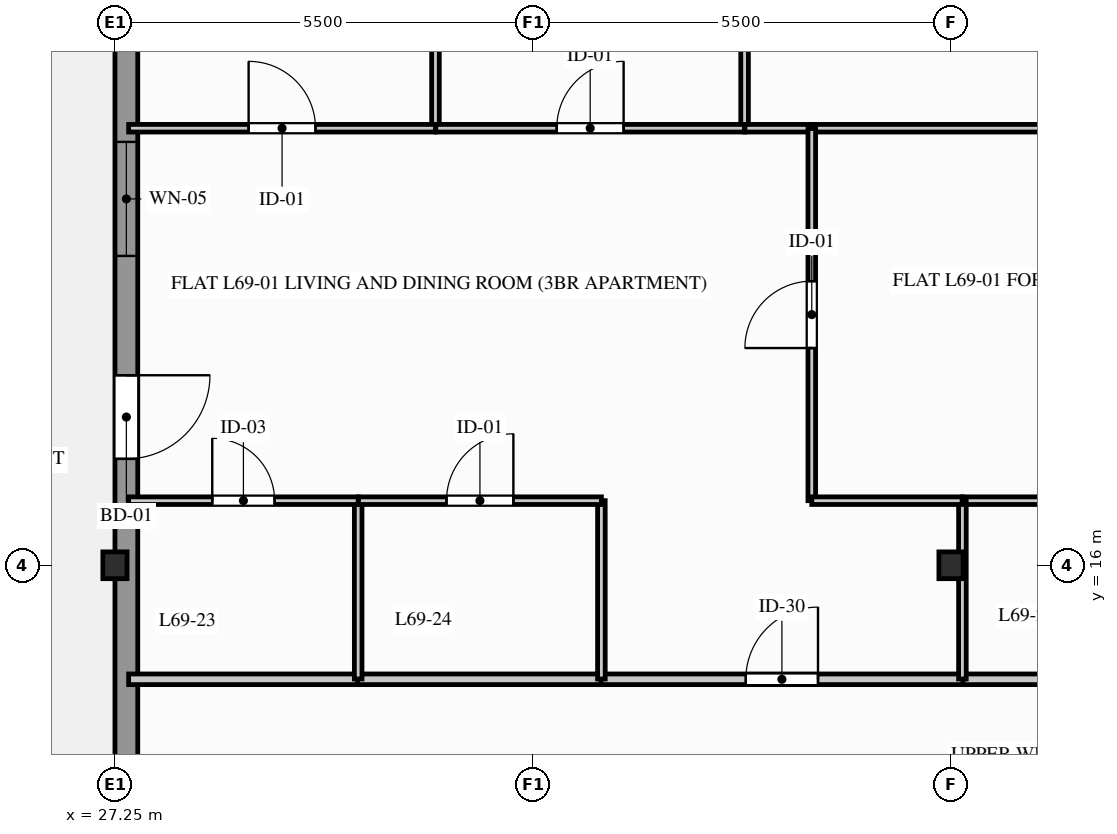
"""IFC4 building model, lengths in metres.
Left out: names, types, materials, properties, quantities, classifications, styles, units other than length and angle.
Written with IfcOpenShell. Run it as: python <this file> out.ifc"""

import sys

from ifc_helpers import new_model, si_unit, direction, frame, frame_2d, origin, origin_2d, place, context, subcontext, project, spatial, rectangle, i_section, extrude, element, fill, save


model = new_model("IFC4")
c1 = context("Model", 3, precision=1e-05, world=origin(), true_north=direction((0.0, 1.0)))
c2 = subcontext(c1, "Body", "Model", "MODEL_VIEW")
j1 = project(units=[si_unit("LENGTHUNIT", "METRE"), si_unit("PLANEANGLEUNIT", "RADIAN")], contexts=[c1])
p1 = place(None, origin())
s1 = spatial("IfcSite", under=j1, at=p1, CompositionType="ELEMENT")
p2 = place(p1, origin())
s2 = spatial("IfcBuilding", under=s1, at=p2, CompositionType="ELEMENT")
p3 = place(p2, frame((0.0, 0.0, 227.3)))
s3 = spatial("IfcBuildingStorey", under=s2, at=p3, CompositionType="ELEMENT", Elevation=227.3)
for number, where, z_axis, x_axis in (
    (1, (27.25, 16.0, 0.0), (0.0, 0.0, 1.0), (1.0, 0.0, 0.0)),
    (2, (38.25, 16.0, 0.0), (0.0, 0.0, 1.0), (1.0, 0.0, 0.0)),
):
    element("IfcColumn", number, at=place(p3, frame(where, z_axis=z_axis, x_axis=x_axis)), inside=s3, PredefinedType="COLUMN", context=c2, shape_type="SweptSolid", body=[
        extrude(i_section(OverallWidth=0.318, OverallDepth=0.353, WebThickness=0.023, FlangeThickness=0.038, FilletRadius=0.015, at=origin_2d()), origin(), (0.0, 0.0, 1.0), 3.1),
    ])
p4 = place(p3, frame((27.4, 24.0, 0.0), z_axis=(0.0, 0.0, 1.0), x_axis=(0.0, -1.0, 0.0)))
e3 = element("IfcWall", 3, at=p4, inside=s3, PredefinedType="STANDARD", context=c2, shape_type="SweptSolid", body=[
    extrude(rectangle(XDim=21.5, YDim=0.3, at=frame_2d((10.75, 0.0))), origin(), (0.0, 0.0, 1.0), 2.332),
])
p5 = place(p4, frame((5.5, 0.0, 0.0)))
e4 = element("IfcOpeningElement", 4, at=p5, cuts=e3, PredefinedType="OPENING", context=c2, shape_type="SweptSolid", body=[
    extrude(rectangle(XDim=1.1, YDim=2.2, at=frame_2d((0.55, 1.1))), frame((0.0, 0.16, 0.0), z_axis=(0.0, -1.0, 0.0), x_axis=(1.0, 0.0, 0.0)), (0.0, 0.0, 1.0), 0.32),
])
p6 = place(p4, frame((2.43, 0.0, 0.312)))
e5 = element("IfcOpeningElement", 5, at=p6, cuts=e3, PredefinedType="OPENING", context=c2, shape_type="SweptSolid", body=[
    extrude(rectangle(XDim=1.5, YDim=1.8, at=frame_2d((0.75, 0.9))), frame((0.0, 0.16, 0.0), z_axis=(0.0, -1.0, 0.0), x_axis=(1.0, 0.0, 0.0)), (0.0, 0.0, 1.0), 0.32),
])
p7 = place(p3, frame((27.43, 14.5, 0.0), z_axis=(0.0, 0.0, 1.0), x_axis=(1.0, 0.0, 0.0)))
e6 = element("IfcWall", 6, at=p7, inside=s3, PredefinedType="PARTITIONING", context=c2, shape_type="SweptSolid", body=[
    extrude(rectangle(XDim=3.031, YDim=0.14, at=frame_2d((1.516, 0.0))), origin(), (0.0, 0.0, 1.0), 2.89),
])
p8 = place(p3, frame((30.443, 14.5, 0.0), z_axis=(0.0, 0.0, 1.0), x_axis=(1.0, 0.0, 0.0)))
e7 = element("IfcWall", 7, at=p8, inside=s3, PredefinedType="PARTITIONING", context=c2, shape_type="SweptSolid", body=[
    extrude(rectangle(XDim=3.219, YDim=0.14, at=frame_2d((1.609, 0.0))), origin(), (0.0, 0.0, 1.0), 2.89),
])
p9 = place(p3, frame((38.389, 14.5, 0.0), z_axis=(0.0, 0.0, 1.0), x_axis=(1.0, 0.0, 0.0)))
e8 = element("IfcWall", 8, at=p9, inside=s3, PredefinedType="PARTITIONING", context=c2, shape_type="SweptSolid", body=[
    extrude(rectangle(XDim=3.623, YDim=0.14, at=frame_2d((1.811, 0.0))), origin(), (0.0, 0.0, 1.0), 2.325),
])
p10 = place(p3, frame((33.643, 14.5, 0.0), z_axis=(0.0, 0.0, 1.0), x_axis=(1.0, 0.0, 0.0)))
e9 = element("IfcWall", 9, at=p10, inside=s3, PredefinedType="PARTITIONING", context=c2, shape_type="SweptSolid", body=[
    extrude(rectangle(XDim=4.765, YDim=0.14, at=frame_2d((2.382, 0.0))), origin(), (0.0, 0.0, 1.0), 2.325),
])
p11 = place(p10, frame((1.907, 0.0, 0.0)))
e10 = element("IfcOpeningElement", 10, at=p11, cuts=e9, PredefinedType="OPENING", context=c2, shape_type="SweptSolid", body=[
    extrude(rectangle(XDim=0.95, YDim=2.05, at=frame_2d((0.475, 1.025))), frame((0.0, 0.08, 0.0), z_axis=(0.0, -1.0, 0.0), x_axis=(1.0, 0.0, 0.0)), (0.0, 0.0, 1.0), 0.16),
])
p12 = place(p3, frame((30.45, 14.504, 0.0), z_axis=(0.0, 0.0, 1.0), x_axis=(0.0, 1.0, 0.0)))
e11 = element("IfcWall", 11, at=p12, inside=s3, PredefinedType="PARTITIONING", context=c2, shape_type="SweptSolid", body=[
    extrude(rectangle(XDim=2.346, YDim=0.1, at=frame_2d((1.173, 0.0))), origin(), (0.0, 0.0, 1.0), 2.325),
])
p13 = place(p3, frame((27.43, 16.85, 0.0), z_axis=(0.0, 0.0, 1.0), x_axis=(1.0, 0.0, 0.0)))
e12 = element("IfcWall", 12, at=p13, inside=s3, PredefinedType="PARTITIONING", context=c2, shape_type="SweptSolid", body=[
    extrude(rectangle(XDim=3.02, YDim=0.1, at=frame_2d((1.51, 0.0))), origin(), (0.0, 0.0, 1.0), 2.89),
])
p14 = place(p13, frame((1.1, 0.0, 0.0)))
e13 = element("IfcOpeningElement", 13, at=p14, cuts=e12, PredefinedType="OPENING", context=c2, shape_type="SweptSolid", body=[
    extrude(rectangle(XDim=0.82, YDim=2.02, at=frame_2d((0.41, 1.01))), frame((0.0, 0.06, 0.0), z_axis=(0.0, -1.0, 0.0), x_axis=(1.0, 0.0, 0.0)), (0.0, 0.0, 1.0), 0.12),
])
p15 = place(p3, frame((33.65, 14.504, 0.0), z_axis=(0.0, 0.0, 1.0), x_axis=(0.0, 1.0, 0.0)))
e14 = element("IfcWall", 14, at=p15, inside=s3, PredefinedType="PARTITIONING", context=c2, shape_type="SweptSolid", body=[
    extrude(rectangle(XDim=2.346, YDim=0.1, at=frame_2d((1.173, 0.0))), origin(), (0.0, 0.0, 1.0), 2.325),
])
p16 = place(p3, frame((30.454, 16.85, 0.0), z_axis=(0.0, 0.0, 1.0), x_axis=(1.0, 0.0, 0.0)))
e15 = element("IfcWall", 15, at=p16, inside=s3, PredefinedType="PARTITIONING", context=c2, shape_type="SweptSolid", body=[
    extrude(rectangle(XDim=3.196, YDim=0.1, at=frame_2d((1.598, 0.0))), origin(), (0.0, 0.0, 1.0), 2.89),
])
p17 = place(p16, frame((1.158, 0.0, 0.0)))
e16 = element("IfcOpeningElement", 16, at=p17, cuts=e15, PredefinedType="OPENING", context=c2, shape_type="SweptSolid", body=[
    extrude(rectangle(XDim=0.88, YDim=2.04, at=frame_2d((0.44, 1.02))), frame((0.0, 0.06, 0.0), z_axis=(0.0, -1.0, 0.0), x_axis=(1.0, 0.0, 0.0)), (0.0, 0.0, 1.0), 0.12),
])
p18 = place(p3, frame((38.4, 16.85, 0.0), z_axis=(0.0, 0.0, 1.0), x_axis=(1.0, 0.0, 0.0)))
e17 = element("IfcWall", 17, at=p18, inside=s3, PredefinedType="PARTITIONING", context=c2, shape_type="SweptSolid", body=[
    extrude(rectangle(XDim=3.6, YDim=0.1, at=frame_2d((1.8, 0.0))), origin(), (0.0, 0.0, 1.0), 2.325),
])
p19 = place(p18, frame((1.39, 0.0, 0.0)))
e18 = element("IfcOpeningElement", 18, at=p19, cuts=e17, PredefinedType="OPENING", context=c2, shape_type="SweptSolid", body=[
    extrude(rectangle(XDim=0.82, YDim=2.02, at=frame_2d((0.41, 1.01))), frame((0.0, 0.06, 0.0), z_axis=(0.0, -1.0, 0.0), x_axis=(1.0, 0.0, 0.0)), (0.0, 0.0, 1.0), 0.12),
])
p20 = place(p3, frame((38.4, 14.504, 0.0), z_axis=(0.0, 0.0, 1.0), x_axis=(0.0, 1.0, 0.0)))
e19 = element("IfcWall", 19, at=p20, inside=s3, PredefinedType="PARTITIONING", context=c2, shape_type="SweptSolid", body=[
    extrude(rectangle(XDim=2.346, YDim=0.1, at=frame_2d((1.173, 0.0))), origin(), (0.0, 0.0, 1.0), 2.325),
])
p21 = place(p3, frame((31.467, 21.75, 0.0), z_axis=(0.0, 0.0, 1.0), x_axis=(0.0, 1.0, 0.0)))
e20 = element("IfcWall", 20, at=p21, inside=s3, PredefinedType="PARTITIONING", context=c2, shape_type="SweptSolid", body=[
    extrude(rectangle(XDim=4.57, YDim=0.1, at=frame_2d((2.285, 0.0))), origin(), (0.0, 0.0, 1.0), 2.325),
])
p22 = place(p3, frame((27.43, 21.75, 0.0), z_axis=(0.0, 0.0, 1.0), x_axis=(1.0, 0.0, 0.0)))
e21 = element("IfcWall", 21, at=p22, inside=s3, PredefinedType="PARTITIONING", context=c2, shape_type="SweptSolid", body=[
    extrude(rectangle(XDim=4.037, YDim=0.1, at=frame_2d((2.019, 0.0))), origin(), (0.0, 0.0, 1.0), 2.89),
])
p23 = place(p22, frame((1.579, 0.0, 0.0)))
e22 = element("IfcOpeningElement", 22, at=p23, cuts=e21, PredefinedType="OPENING", context=c2, shape_type="SweptSolid", body=[
    extrude(rectangle(XDim=0.88, YDim=2.04, at=frame_2d((0.44, 1.02))), frame((0.0, 0.06, 0.0), z_axis=(0.0, -1.0, 0.0), x_axis=(1.0, 0.0, 0.0)), (0.0, 0.0, 1.0), 0.12),
])
p24 = place(p3, frame((35.534, 21.75, 0.0), z_axis=(0.0, 0.0, 1.0), x_axis=(0.0, 1.0, 0.0)))
e23 = element("IfcWall", 23, at=p24, inside=s3, PredefinedType="PARTITIONING", context=c2, shape_type="SweptSolid", body=[
    extrude(rectangle(XDim=4.57, YDim=0.1, at=frame_2d((2.285, 0.0))), origin(), (0.0, 0.0, 1.0), 2.325),
])
p25 = place(p24, frame((1.875, 0.0, 0.0)))
e24 = element("IfcOpeningElement", 24, at=p25, cuts=e23, PredefinedType="OPENING", context=c2, shape_type="SweptSolid", body=[
    extrude(rectangle(XDim=0.82, YDim=2.02, at=frame_2d((0.41, 1.01))), frame((0.0, 0.06, 0.0), z_axis=(0.0, -1.0, 0.0), x_axis=(1.0, 0.0, 0.0)), (0.0, 0.0, 1.0), 0.12),
])
p26 = place(p3, frame((31.471, 21.75, 0.0), z_axis=(0.0, 0.0, 1.0), x_axis=(1.0, 0.0, 0.0)))
e25 = element("IfcWall", 25, at=p26, inside=s3, PredefinedType="PARTITIONING", context=c2, shape_type="SweptSolid", body=[
    extrude(rectangle(XDim=4.063, YDim=0.1, at=frame_2d((2.031, 0.0))), origin(), (0.0, 0.0, 1.0), 2.89),
])
p27 = place(p26, frame((1.592, 0.0, 0.0)))
e26 = element("IfcOpeningElement", 26, at=p27, cuts=e25, PredefinedType="OPENING", context=c2, shape_type="SweptSolid", body=[
    extrude(rectangle(XDim=0.88, YDim=2.04, at=frame_2d((0.44, 1.02))), frame((0.0, 0.06, 0.0), z_axis=(0.0, -1.0, 0.0), x_axis=(1.0, 0.0, 0.0)), (0.0, 0.0, 1.0), 0.12),
])
p28 = place(p3, frame((36.407, 21.75, 0.0), z_axis=(0.0, 0.0, 1.0), x_axis=(1.0, 0.0, 0.0)))
e27 = element("IfcWall", 27, at=p28, inside=s3, PredefinedType="PARTITIONING", context=c2, shape_type="SweptSolid", body=[
    extrude(rectangle(XDim=3.194, YDim=0.1, at=frame_2d((1.597, 0.0))), origin(), (0.0, 0.0, 1.0), 2.325),
])
p29 = place(p3, frame((35.538, 21.75, 0.0), z_axis=(0.0, 0.0, 1.0), x_axis=(1.0, 0.0, 0.0)))
e28 = element("IfcWall", 28, at=p29, inside=s3, PredefinedType="PARTITIONING", context=c2, shape_type="SweptSolid", body=[
    extrude(rectangle(XDim=0.887, YDim=0.1, at=frame_2d((0.444, 0.0))), origin(), (0.0, 0.0, 1.0), 2.89),
])
p30 = place(p3, frame((36.418, 16.85, 0.0), z_axis=(0.0, 0.0, 1.0), x_axis=(0.0, 1.0, 0.0)))
e29 = element("IfcWall", 29, at=p30, inside=s3, PredefinedType="PARTITIONING", context=c2, shape_type="SweptSolid", body=[
    extrude(rectangle(XDim=4.896, YDim=0.1, at=frame_2d((2.448, 0.0))), origin(), (0.0, 0.0, 1.0), 2.614),
])
p31 = place(p30, frame((2.008, 0.0, 0.0)))
e30 = element("IfcOpeningElement", 30, at=p31, cuts=e29, PredefinedType="OPENING", context=c2, shape_type="SweptSolid", body=[
    extrude(rectangle(XDim=0.88, YDim=2.04, at=frame_2d((0.44, 1.02))), frame((0.0, 0.06, 0.0), z_axis=(0.0, -1.0, 0.0), x_axis=(1.0, 0.0, 0.0)), (0.0, 0.0, 1.0), 0.12),
])
p32 = place(p3, frame((36.418, 16.85, 0.0), z_axis=(0.0, 0.0, 1.0), x_axis=(1.0, 0.0, 0.0)))
e31 = element("IfcWall", 31, at=p32, inside=s3, PredefinedType="PARTITIONING", context=c2, shape_type="SweptSolid", body=[
    extrude(rectangle(XDim=1.978, YDim=0.1, at=frame_2d((0.989, 0.0))), origin(), (0.0, 0.0, 1.0), 2.325),
])
p33 = place(p5, origin())
e32 = element("IfcDoor", 32, at=p33, inside=s3, OperationType="SINGLE_SWING_LEFT", PredefinedType="DOOR", context=c2, shape_type="SweptSolid", body=[
    extrude(rectangle(XDim=1.1, YDim=2.2, at=frame_2d((0.55, 1.1))), frame((0.0, 0.025, 0.0), z_axis=(0.0, -1.0, 0.0), x_axis=(1.0, 0.0, 0.0)), (0.0, 0.0, 1.0), 0.05),
])
fill(e4, e32)
p34 = place(p6, origin())
e33 = element("IfcWindow", 33, at=p34, inside=s3, PartitioningType="SINGLE_PANEL", PredefinedType="WINDOW", context=c2, shape_type="SweptSolid", body=[
    extrude(rectangle(XDim=1.5, YDim=1.8, at=frame_2d((0.75, 0.9))), frame((0.0, 0.03, 0.0), z_axis=(0.0, -1.0, 0.0), x_axis=(1.0, 0.0, 0.0)), (0.0, 0.0, 1.0), 0.06),
])
fill(e5, e33)
p35 = place(p11, origin())
e34 = element("IfcDoor", 34, at=p35, inside=s3, OperationType="SINGLE_SWING_RIGHT", PredefinedType="DOOR", context=c2, shape_type="SweptSolid", body=[
    extrude(rectangle(XDim=0.95, YDim=2.05, at=frame_2d((0.475, 1.025))), frame((0.0, 0.025, 0.0), z_axis=(0.0, -1.0, 0.0), x_axis=(1.0, 0.0, 0.0)), (0.0, 0.0, 1.0), 0.05),
])
fill(e10, e34)
p36 = place(p14, origin())
e35 = element("IfcDoor", 35, at=p36, inside=s3, OperationType="SINGLE_SWING_LEFT", PredefinedType="DOOR", context=c2, shape_type="SweptSolid", body=[
    extrude(rectangle(XDim=0.82, YDim=2.02, at=frame_2d((0.41, 1.01))), frame((0.0, 0.025, 0.0), z_axis=(0.0, -1.0, 0.0), x_axis=(1.0, 0.0, 0.0)), (0.0, 0.0, 1.0), 0.05),
])
fill(e13, e35)
p37 = place(p17, origin())
e36 = element("IfcDoor", 36, at=p37, inside=s3, OperationType="SINGLE_SWING_RIGHT", PredefinedType="DOOR", context=c2, shape_type="SweptSolid", body=[
    extrude(rectangle(XDim=0.88, YDim=2.04, at=frame_2d((0.44, 1.02))), frame((0.0, 0.025, 0.0), z_axis=(0.0, -1.0, 0.0), x_axis=(1.0, 0.0, 0.0)), (0.0, 0.0, 1.0), 0.05),
])
fill(e16, e36)
p38 = place(p23, origin())
e37 = element("IfcDoor", 37, at=p38, inside=s3, OperationType="SINGLE_SWING_LEFT", PredefinedType="DOOR", context=c2, shape_type="SweptSolid", body=[
    extrude(rectangle(XDim=0.88, YDim=2.04, at=frame_2d((0.44, 1.02))), frame((0.0, 0.025, 0.0), z_axis=(0.0, -1.0, 0.0), x_axis=(1.0, 0.0, 0.0)), (0.0, 0.0, 1.0), 0.05),
])
fill(e22, e37)
p39 = place(p27, origin())
e38 = element("IfcDoor", 38, at=p39, inside=s3, OperationType="SINGLE_SWING_RIGHT", PredefinedType="DOOR", context=c2, shape_type="SweptSolid", body=[
    extrude(rectangle(XDim=0.88, YDim=2.04, at=frame_2d((0.44, 1.02))), frame((0.0, 0.025, 0.0), z_axis=(0.0, -1.0, 0.0), x_axis=(1.0, 0.0, 0.0)), (0.0, 0.0, 1.0), 0.05),
])
fill(e26, e38)
p40 = place(p31, origin())
e39 = element("IfcDoor", 39, at=p40, inside=s3, OperationType="SINGLE_SWING_LEFT", PredefinedType="DOOR", context=c2, shape_type="SweptSolid", body=[
    extrude(rectangle(XDim=0.88, YDim=2.04, at=frame_2d((0.44, 1.02))), frame((0.0, 0.025, 0.0), z_axis=(0.0, -1.0, 0.0), x_axis=(1.0, 0.0, 0.0)), (0.0, 0.0, 1.0), 0.05),
])
fill(e30, e39)
save(model, sys.argv[1])
